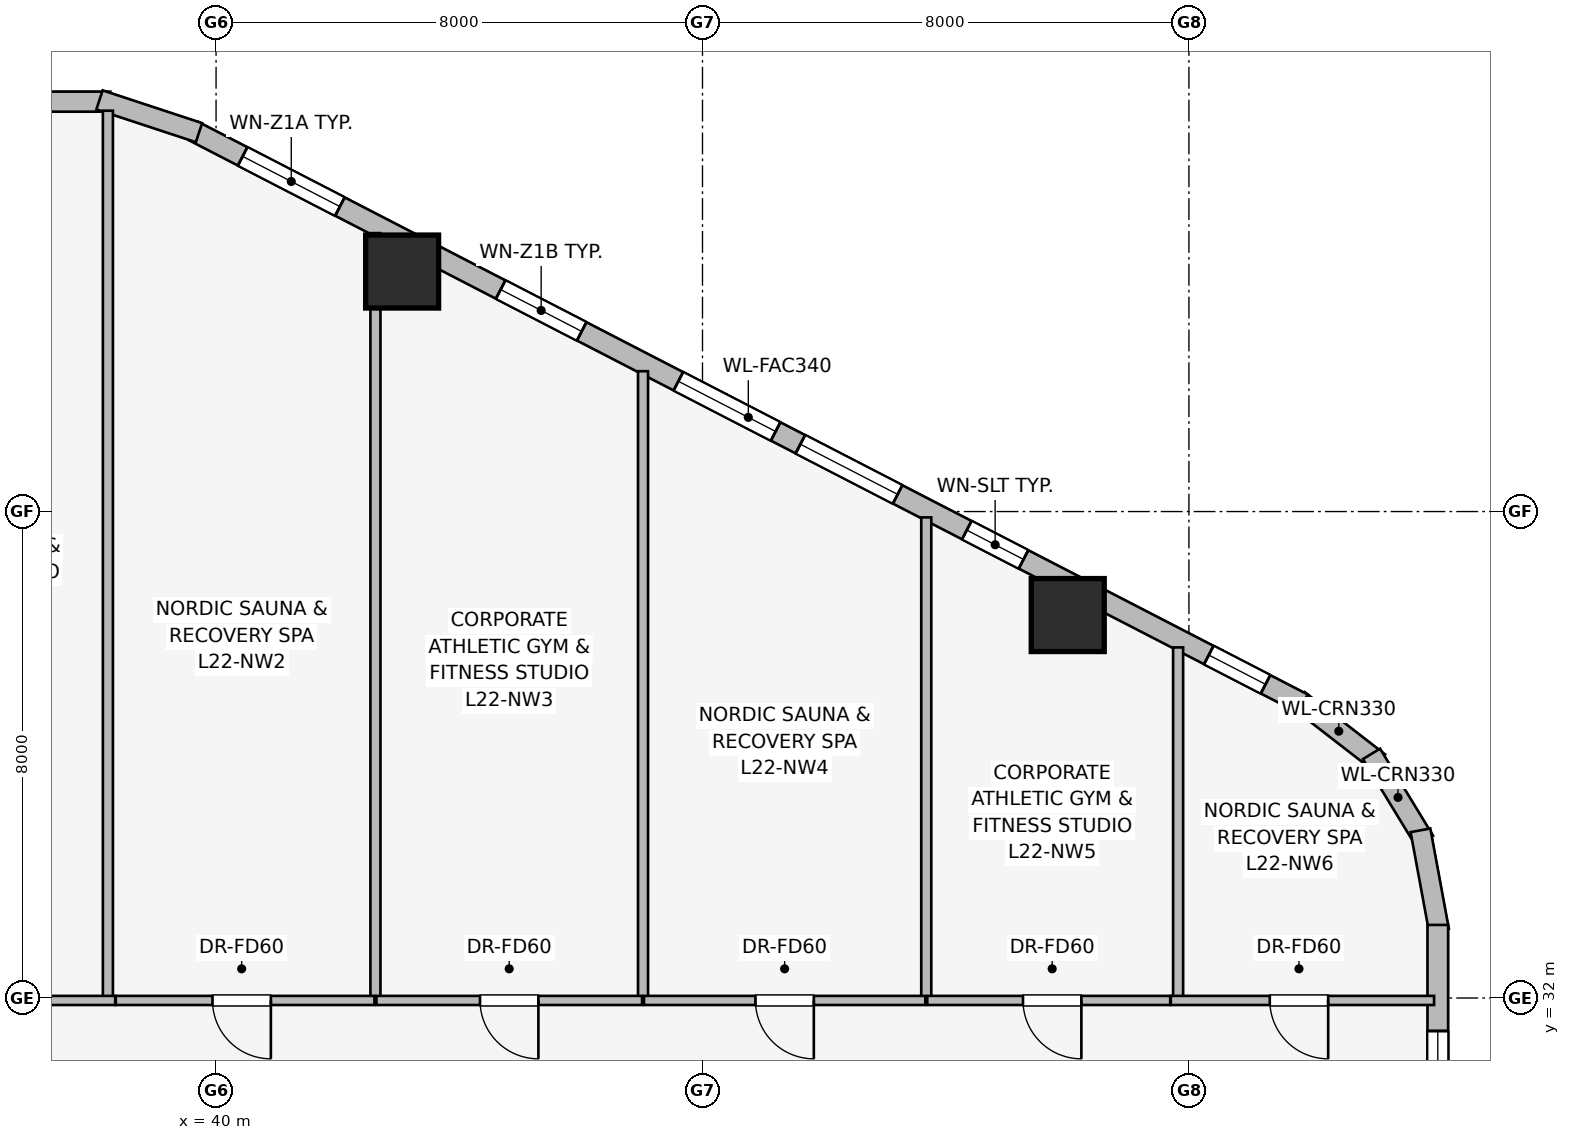
"""IFC4 building model, lengths in metres.
Left out: names, types, materials, properties, quantities, classifications, styles, units other than length and angle.
Written with IfcOpenShell. Run it as: python <this file> out.ifc"""

import sys

from ifc_helpers import new_model, si_unit, direction, frame, frame_2d, origin, origin_2d, place, context, subcontext, project, spatial, rectangle, extrude, element, fill, save


model = new_model("IFC4")
c1 = context("Model", 3, precision=1e-05, world=origin(), true_north=direction((0.0, 1.0)))
c2 = subcontext(c1, "Body", "Model", "MODEL_VIEW")
j1 = project(units=[si_unit("LENGTHUNIT", "METRE"), si_unit("PLANEANGLEUNIT", "RADIAN")], contexts=[c1])
p1 = place(None, origin())
s1 = spatial("IfcSite", under=j1, at=p1, CompositionType="ELEMENT")
p2 = place(p1, origin())
s2 = spatial("IfcBuilding", under=s1, at=p2, CompositionType="ELEMENT")
p3 = place(p2, frame((0.0, 0.0, 85.4)))
s3 = spatial("IfcBuildingStorey", under=s2, at=p3, CompositionType="ELEMENT", Elevation=85.4)
for number, where, z_axis, x_axis in (
    (1, (54.007, 38.298, 0.0), (0.0, 0.0, 1.0), (1.0, 0.0, 0.0)),
    (2, (43.06, 43.947, 0.0), (0.0, 0.0, 1.0), (1.0, 0.0, 0.0)),
):
    element("IfcColumn", number, at=place(p3, frame(where, z_axis=z_axis, x_axis=x_axis)), inside=s3, PredefinedType="COLUMN", context=c2, shape_type="SweptSolid", body=[
        extrude(rectangle(XDim=1.2, YDim=1.2, at=origin_2d()), origin(), (0.0, 0.0, 1.0), 3.65),
    ])
p4 = place(p3, frame((57.802, 36.901, 0.0), z_axis=(0.0, 0.0, 1.0), x_axis=(0.790691856293, -0.61221433207, 0.0)))
e3 = element("IfcWall", 3, at=p4, inside=s3, PredefinedType="STANDARD", context=c2, shape_type="SweptSolid", body=[
    extrude(rectangle(XDim=1.676, YDim=0.33, at=frame_2d((0.838, 0.0))), origin(), (0.0, 0.0, 1.0), 3.39),
])
p5 = place(p3, frame((59.002, 36.015, 0.0), z_axis=(0.0, 0.0, 1.0), x_axis=(0.520584129191, -0.853810379671, 0.0)))
e4 = element("IfcWall", 4, at=p5, inside=s3, PredefinedType="STANDARD", context=c2, shape_type="SweptSolid", body=[
    extrude(rectangle(XDim=1.677, YDim=0.33, at=frame_2d((0.838, 0.0))), origin(), (0.0, 0.0, 1.0), 3.39),
])
p6 = place(p3, frame((59.808, 34.758, 0.0), z_axis=(0.0, 0.0, 1.0), x_axis=(0.181714143354, -0.983351397063, 0.0)))
e5 = element("IfcWall", 5, at=p6, inside=s3, PredefinedType="STANDARD", context=c2, shape_type="SweptSolid", body=[
    extrude(rectangle(XDim=1.678, YDim=0.33, at=frame_2d((0.839, 0.0))), origin(), (0.0, 0.0, 1.0), 3.39),
])
p7 = place(p3, frame((39.631, 46.257, 0.0), z_axis=(0.0, 0.0, 1.0), x_axis=(0.888634413993, -0.458616264721, 0.0)))
e6 = element("IfcWall", 6, at=p7, inside=s3, PredefinedType="STANDARD", context=c2, shape_type="SweptSolid", body=[
    extrude(rectangle(XDim=20.531, YDim=0.34, at=frame_2d((10.266, 0.0))), origin(), (0.0, 0.0, 1.0), 2.684),
])
p8 = place(p7, frame((0.907, 0.0, 0.75)))
e7 = element("IfcOpeningElement", 7, at=p8, cuts=e6, PredefinedType="OPENING", context=c2, shape_type="SweptSolid", body=[
    extrude(rectangle(XDim=1.8, YDim=1.5, at=frame_2d((0.9, 0.75))), frame((0.0, 0.18, 0.0), z_axis=(0.0, -1.0, 0.0), x_axis=(1.0, 0.0, 0.0)), (0.0, 0.0, 1.0), 0.36),
])
p9 = place(p7, frame((5.682, 0.0, 0.75)))
e8 = element("IfcOpeningElement", 8, at=p9, cuts=e6, PredefinedType="OPENING", context=c2, shape_type="SweptSolid", body=[
    extrude(rectangle(XDim=1.5, YDim=1.5, at=frame_2d((0.75, 0.75))), frame((0.0, 0.18, 0.0), z_axis=(0.0, -1.0, 0.0), x_axis=(1.0, 0.0, 0.0)), (0.0, 0.0, 1.0), 0.36),
])
p10 = place(p7, frame((8.971, 0.0, 0.75)))
e9 = element("IfcOpeningElement", 9, at=p10, cuts=e6, PredefinedType="OPENING", context=c2, shape_type="SweptSolid", body=[
    extrude(rectangle(XDim=1.8, YDim=1.5, at=frame_2d((0.9, 0.75))), frame((0.0, 0.18, 0.0), z_axis=(0.0, -1.0, 0.0), x_axis=(1.0, 0.0, 0.0)), (0.0, 0.0, 1.0), 0.36),
])
p11 = place(p7, frame((11.229, 0.0, 0.75)))
e10 = element("IfcOpeningElement", 10, at=p11, cuts=e6, PredefinedType="OPENING", context=c2, shape_type="SweptSolid", body=[
    extrude(rectangle(XDim=1.8, YDim=1.5, at=frame_2d((0.9, 0.75))), frame((0.0, 0.18, 0.0), z_axis=(0.0, -1.0, 0.0), x_axis=(1.0, 0.0, 0.0)), (0.0, 0.0, 1.0), 0.36),
])
p12 = place(p7, frame((14.309, 0.0, 0.75)))
e11 = element("IfcOpeningElement", 11, at=p12, cuts=e6, PredefinedType="OPENING", context=c2, shape_type="SweptSolid", body=[
    extrude(rectangle(XDim=1.05, YDim=1.4, at=frame_2d((0.525, 0.7))), frame((0.0, 0.18, 0.0), z_axis=(0.0, -1.0, 0.0), x_axis=(1.0, 0.0, 0.0)), (0.0, 0.0, 1.0), 0.36),
])
p13 = place(p7, frame((18.788, 0.0, 0.75)))
e12 = element("IfcOpeningElement", 12, at=p13, cuts=e6, PredefinedType="OPENING", context=c2, shape_type="SweptSolid", body=[
    extrude(rectangle(XDim=1.05, YDim=1.4, at=frame_2d((0.525, 0.7))), frame((0.0, 0.18, 0.0), z_axis=(0.0, -1.0, 0.0), x_axis=(1.0, 0.0, 0.0)), (0.0, 0.0, 1.0), 0.36),
])
p14 = place(p3, frame((36.539, 46.741, 0.0), z_axis=(0.0, 0.0, 1.0), x_axis=(1.0, 0.0, 0.0)))
e13 = element("IfcWall", 13, at=p14, inside=s3, PredefinedType="STANDARD", context=c2, shape_type="SweptSolid", body=[
    extrude(rectangle(XDim=1.722, YDim=0.33, at=frame_2d((0.861, 0.0))), origin(), (0.0, 0.0, 1.0), 3.39),
])
p15 = place(p3, frame((38.083, 46.77, 0.0), z_axis=(0.0, 0.0, 1.0), x_axis=(0.94976901097, -0.312951794691, 0.0)))
e14 = element("IfcWall", 14, at=p15, inside=s3, PredefinedType="STANDARD", context=c2, shape_type="SweptSolid", body=[
    extrude(rectangle(XDim=1.722, YDim=0.33, at=frame_2d((0.861, 0.0))), origin(), (0.0, 0.0, 1.0), 3.39),
])
p16 = place(p3, frame((60.093, 33.202, 0.0), z_axis=(0.0, 0.0, 1.0), x_axis=(0.0, -1.0, 0.0)))
e15 = element("IfcWall", 15, at=p16, inside=s3, PredefinedType="STANDARD", context=c2, shape_type="SweptSolid", body=[
    extrude(rectangle(XDim=18.404, YDim=0.34, at=frame_2d((9.202, 0.0))), origin(), (0.0, 0.0, 1.0), 2.684),
])
p17 = place(p16, frame((1.744, 0.0, 0.75)))
e16 = element("IfcOpeningElement", 16, at=p17, cuts=e15, PredefinedType="OPENING", context=c2, shape_type="SweptSolid", body=[
    extrude(rectangle(XDim=1.05, YDim=1.4, at=frame_2d((0.525, 0.7))), frame((0.0, 0.18, 0.0), z_axis=(0.0, -1.0, 0.0), x_axis=(1.0, 0.0, 0.0)), (0.0, 0.0, 1.0), 0.36),
])
p18 = place(p16, frame((5.265, 0.0, 0.75)))
e17 = element("IfcOpeningElement", 17, at=p18, cuts=e15, PredefinedType="OPENING", context=c2, shape_type="SweptSolid", body=[
    extrude(rectangle(XDim=1.5, YDim=1.5, at=frame_2d((0.75, 0.75))), frame((0.0, 0.18, 0.0), z_axis=(0.0, -1.0, 0.0), x_axis=(1.0, 0.0, 0.0)), (0.0, 0.0, 1.0), 0.36),
])
p19 = place(p16, frame((8.452, 0.0, 0.75)))
e18 = element("IfcOpeningElement", 18, at=p19, cuts=e15, PredefinedType="OPENING", context=c2, shape_type="SweptSolid", body=[
    extrude(rectangle(XDim=1.5, YDim=1.5, at=frame_2d((0.75, 0.75))), frame((0.0, 0.18, 0.0), z_axis=(0.0, -1.0, 0.0), x_axis=(1.0, 0.0, 0.0)), (0.0, 0.0, 1.0), 0.36),
])
p20 = place(p16, frame((11.639, 0.0, 0.75)))
e19 = element("IfcOpeningElement", 19, at=p20, cuts=e15, PredefinedType="OPENING", context=c2, shape_type="SweptSolid", body=[
    extrude(rectangle(XDim=1.5, YDim=1.5, at=frame_2d((0.75, 0.75))), frame((0.0, 0.18, 0.0), z_axis=(0.0, -1.0, 0.0), x_axis=(1.0, 0.0, 0.0)), (0.0, 0.0, 1.0), 0.36),
])
p21 = place(p16, frame((15.65, 0.0, 0.75)))
e20 = element("IfcOpeningElement", 20, at=p21, cuts=e15, PredefinedType="OPENING", context=c2, shape_type="SweptSolid", body=[
    extrude(rectangle(XDim=1.05, YDim=1.4, at=frame_2d((0.525, 0.7))), frame((0.0, 0.18, 0.0), z_axis=(0.0, -1.0, 0.0), x_axis=(1.0, 0.0, 0.0)), (0.0, 0.0, 1.0), 0.36),
])
p22 = place(p3, frame((38.221, 31.97, 0.0), z_axis=(0.0, 0.0, 1.0), x_axis=(0.0, 1.0, 0.0)))
e21 = element("IfcWall", 21, at=p22, inside=s3, PredefinedType="PARTITIONING", context=c2, shape_type="SweptSolid", body=[
    extrude(rectangle(XDim=14.622, YDim=0.165, at=frame_2d((7.311, 0.0))), origin(), (0.0, 0.0, 1.0), 3.39),
])
p23 = place(p3, frame((42.621, 31.97, 0.0), z_axis=(0.0, 0.0, 1.0), x_axis=(0.0, 1.0, 0.0)))
e22 = element("IfcWall", 22, at=p23, inside=s3, PredefinedType="PARTITIONING", context=c2, shape_type="SweptSolid", body=[
    extrude(rectangle(XDim=12.609, YDim=0.165, at=frame_2d((6.305, 0.0))), origin(), (0.0, 0.0, 1.0), 2.513),
])
p24 = place(p3, frame((47.022, 31.97, 0.0), z_axis=(0.0, 0.0, 1.0), x_axis=(0.0, 1.0, 0.0)))
e23 = element("IfcWall", 23, at=p24, inside=s3, PredefinedType="PARTITIONING", context=c2, shape_type="SweptSolid", body=[
    extrude(rectangle(XDim=10.338, YDim=0.165, at=frame_2d((5.169, 0.0))), origin(), (0.0, 0.0, 1.0), 3.39),
])
p25 = place(p3, frame((51.68, 31.97, 0.0), z_axis=(0.0, 0.0, 1.0), x_axis=(0.0, 1.0, 0.0)))
e24 = element("IfcWall", 24, at=p25, inside=s3, PredefinedType="PARTITIONING", context=c2, shape_type="SweptSolid", body=[
    extrude(rectangle(XDim=7.934, YDim=0.165, at=frame_2d((3.967, 0.0))), origin(), (0.0, 0.0, 1.0), 3.39),
])
p26 = place(p3, frame((55.822, 31.97, 0.0), z_axis=(0.0, 0.0, 1.0), x_axis=(0.0, 1.0, 0.0)))
e25 = element("IfcWall", 25, at=p26, inside=s3, PredefinedType="PARTITIONING", context=c2, shape_type="SweptSolid", body=[
    extrude(rectangle(XDim=5.796, YDim=0.165, at=frame_2d((2.898, 0.0))), origin(), (0.0, 0.0, 1.0), 3.39),
])
p27 = place(p3, frame((38.341, 31.96, 0.0), z_axis=(0.0, 0.0, 1.0), x_axis=(-1.0, 0.0, 0.0)))
e26 = element("IfcWall", 26, at=p27, inside=s3, PredefinedType="PARTITIONING", context=c2, shape_type="SweptSolid", body=[
    extrude(rectangle(XDim=4.051, YDim=0.15, at=frame_2d((2.025, 0.0))), origin(), (0.0, 0.0, 1.0), 3.39),
])
p28 = place(p27, frame((1.489, 0.0, 0.0)))
e27 = element("IfcOpeningElement", 27, at=p28, cuts=e26, PredefinedType="OPENING", context=c2, shape_type="SweptSolid", body=[
    extrude(rectangle(XDim=0.96, YDim=2.0, at=frame_2d((0.48, 1.0))), frame((0.0, 0.085, 0.0), z_axis=(0.0, -1.0, 0.0), x_axis=(1.0, 0.0, 0.0)), (0.0, 0.0, 1.0), 0.17),
])
p29 = place(p3, frame((42.605, 31.96, 0.0), z_axis=(0.0, 0.0, 1.0), x_axis=(-1.0, 0.0, 0.0)))
e28 = element("IfcWall", 28, at=p29, inside=s3, PredefinedType="PARTITIONING", context=c2, shape_type="SweptSolid", body=[
    extrude(rectangle(XDim=4.254, YDim=0.15, at=frame_2d((2.127, 0.0))), origin(), (0.0, 0.0, 1.0), 3.39),
])
p30 = place(p29, frame((1.704, 0.0, 0.0)))
e29 = element("IfcOpeningElement", 29, at=p30, cuts=e28, PredefinedType="OPENING", context=c2, shape_type="SweptSolid", body=[
    extrude(rectangle(XDim=0.96, YDim=2.0, at=frame_2d((0.48, 1.0))), frame((0.0, 0.085, 0.0), z_axis=(0.0, -1.0, 0.0), x_axis=(1.0, 0.0, 0.0)), (0.0, 0.0, 1.0), 0.17),
])
p31 = place(p3, frame((47.006, 31.96, 0.0), z_axis=(0.0, 0.0, 1.0), x_axis=(-1.0, 0.0, 0.0)))
e30 = element("IfcWall", 30, at=p31, inside=s3, PredefinedType="PARTITIONING", context=c2, shape_type="SweptSolid", body=[
    extrude(rectangle(XDim=4.369, YDim=0.15, at=frame_2d((2.185, 0.0))), origin(), (0.0, 0.0, 1.0), 3.39),
])
p32 = place(p31, frame((1.705, 0.0, 0.0)))
e31 = element("IfcOpeningElement", 31, at=p32, cuts=e30, PredefinedType="OPENING", context=c2, shape_type="SweptSolid", body=[
    extrude(rectangle(XDim=0.96, YDim=2.0, at=frame_2d((0.48, 1.0))), frame((0.0, 0.085, 0.0), z_axis=(0.0, -1.0, 0.0), x_axis=(1.0, 0.0, 0.0)), (0.0, 0.0, 1.0), 0.17),
])
p33 = place(p3, frame((51.664, 31.96, 0.0), z_axis=(0.0, 0.0, 1.0), x_axis=(-1.0, 0.0, 0.0)))
e32 = element("IfcWall", 32, at=p33, inside=s3, PredefinedType="PARTITIONING", context=c2, shape_type="SweptSolid", body=[
    extrude(rectangle(XDim=4.626, YDim=0.15, at=frame_2d((2.313, 0.0))), origin(), (0.0, 0.0, 1.0), 3.39),
])
p34 = place(p33, frame((1.833, 0.0, 0.0)))
e33 = element("IfcOpeningElement", 33, at=p34, cuts=e32, PredefinedType="OPENING", context=c2, shape_type="SweptSolid", body=[
    extrude(rectangle(XDim=0.96, YDim=2.0, at=frame_2d((0.48, 1.0))), frame((0.0, 0.085, 0.0), z_axis=(0.0, -1.0, 0.0), x_axis=(1.0, 0.0, 0.0)), (0.0, 0.0, 1.0), 0.17),
])
p35 = place(p3, frame((55.692, 31.96, 0.0), z_axis=(0.0, 0.0, 1.0), x_axis=(-1.0, 0.0, 0.0)))
e34 = element("IfcWall", 34, at=p35, inside=s3, PredefinedType="PARTITIONING", context=c2, shape_type="SweptSolid", body=[
    extrude(rectangle(XDim=3.996, YDim=0.15, at=frame_2d((1.998, 0.0))), origin(), (0.0, 0.0, 1.0), 3.39),
])
p36 = place(p35, frame((1.461, 0.0, 0.0)))
e35 = element("IfcOpeningElement", 35, at=p36, cuts=e34, PredefinedType="OPENING", context=c2, shape_type="SweptSolid", body=[
    extrude(rectangle(XDim=0.96, YDim=2.0, at=frame_2d((0.48, 1.0))), frame((0.0, 0.085, 0.0), z_axis=(0.0, -1.0, 0.0), x_axis=(1.0, 0.0, 0.0)), (0.0, 0.0, 1.0), 0.17),
])
p37 = place(p3, frame((60.032, 31.96, 0.0), z_axis=(0.0, 0.0, 1.0), x_axis=(-1.0, 0.0, 0.0)))
e36 = element("IfcWall", 36, at=p37, inside=s3, PredefinedType="PARTITIONING", context=c2, shape_type="SweptSolid", body=[
    extrude(rectangle(XDim=4.33, YDim=0.15, at=frame_2d((2.165, 0.0))), origin(), (0.0, 0.0, 1.0), 3.39),
])
p38 = place(p37, frame((1.742, 0.0, 0.0)))
e37 = element("IfcOpeningElement", 37, at=p38, cuts=e36, PredefinedType="OPENING", context=c2, shape_type="SweptSolid", body=[
    extrude(rectangle(XDim=0.96, YDim=2.0, at=frame_2d((0.48, 1.0))), frame((0.0, 0.085, 0.0), z_axis=(0.0, -1.0, 0.0), x_axis=(1.0, 0.0, 0.0)), (0.0, 0.0, 1.0), 0.17),
])
p39 = place(p8, origin())
e38 = element("IfcWindow", 38, at=p39, inside=s3, PartitioningType="SINGLE_PANEL", PredefinedType="WINDOW", context=c2, shape_type="SweptSolid", body=[
    extrude(rectangle(XDim=1.8, YDim=1.5, at=frame_2d((0.9, 0.75))), frame((0.0, 0.03, 0.0), z_axis=(0.0, -1.0, 0.0), x_axis=(1.0, 0.0, 0.0)), (0.0, 0.0, 1.0), 0.06),
])
fill(e7, e38)
p40 = place(p9, origin())
e39 = element("IfcWindow", 39, at=p40, inside=s3, PartitioningType="SINGLE_PANEL", PredefinedType="WINDOW", context=c2, shape_type="SweptSolid", body=[
    extrude(rectangle(XDim=1.5, YDim=1.5, at=frame_2d((0.75, 0.75))), frame((0.0, 0.03, 0.0), z_axis=(0.0, -1.0, 0.0), x_axis=(1.0, 0.0, 0.0)), (0.0, 0.0, 1.0), 0.06),
])
fill(e8, e39)
p41 = place(p10, origin())
e40 = element("IfcWindow", 40, at=p41, inside=s3, PartitioningType="SINGLE_PANEL", PredefinedType="WINDOW", context=c2, shape_type="SweptSolid", body=[
    extrude(rectangle(XDim=1.8, YDim=1.5, at=frame_2d((0.9, 0.75))), frame((0.0, 0.03, 0.0), z_axis=(0.0, -1.0, 0.0), x_axis=(1.0, 0.0, 0.0)), (0.0, 0.0, 1.0), 0.06),
])
fill(e9, e40)
p42 = place(p11, origin())
e41 = element("IfcWindow", 41, at=p42, inside=s3, PartitioningType="SINGLE_PANEL", PredefinedType="WINDOW", context=c2, shape_type="SweptSolid", body=[
    extrude(rectangle(XDim=1.8, YDim=1.5, at=frame_2d((0.9, 0.75))), frame((0.0, 0.03, 0.0), z_axis=(0.0, -1.0, 0.0), x_axis=(1.0, 0.0, 0.0)), (0.0, 0.0, 1.0), 0.06),
])
fill(e10, e41)
p43 = place(p12, origin())
e42 = element("IfcWindow", 42, at=p43, inside=s3, PartitioningType="SINGLE_PANEL", PredefinedType="WINDOW", context=c2, shape_type="SweptSolid", body=[
    extrude(rectangle(XDim=1.05, YDim=1.4, at=frame_2d((0.525, 0.7))), frame((0.0, 0.03, 0.0), z_axis=(0.0, -1.0, 0.0), x_axis=(1.0, 0.0, 0.0)), (0.0, 0.0, 1.0), 0.06),
])
fill(e11, e42)
p44 = place(p13, origin())
e43 = element("IfcWindow", 43, at=p44, inside=s3, PartitioningType="SINGLE_PANEL", PredefinedType="WINDOW", context=c2, shape_type="SweptSolid", body=[
    extrude(rectangle(XDim=1.05, YDim=1.4, at=frame_2d((0.525, 0.7))), frame((0.0, 0.03, 0.0), z_axis=(0.0, -1.0, 0.0), x_axis=(1.0, 0.0, 0.0)), (0.0, 0.0, 1.0), 0.06),
])
fill(e12, e43)
p45 = place(p17, origin())
e44 = element("IfcWindow", 44, at=p45, inside=s3, PartitioningType="SINGLE_PANEL", PredefinedType="WINDOW", context=c2, shape_type="SweptSolid", body=[
    extrude(rectangle(XDim=1.05, YDim=1.4, at=frame_2d((0.525, 0.7))), frame((0.0, 0.03, 0.0), z_axis=(0.0, -1.0, 0.0), x_axis=(1.0, 0.0, 0.0)), (0.0, 0.0, 1.0), 0.06),
])
fill(e16, e44)
p46 = place(p30, origin())
e45 = element("IfcDoor", 45, at=p46, inside=s3, OperationType="SINGLE_SWING_LEFT", PredefinedType="DOOR", context=c2, shape_type="SweptSolid", body=[
    extrude(rectangle(XDim=0.96, YDim=2.0, at=frame_2d((0.48, 1.0))), frame((0.0, 0.025, 0.0), z_axis=(0.0, -1.0, 0.0), x_axis=(1.0, 0.0, 0.0)), (0.0, 0.0, 1.0), 0.05),
])
fill(e29, e45)
p47 = place(p32, origin())
e46 = element("IfcDoor", 46, at=p47, inside=s3, OperationType="SINGLE_SWING_LEFT", PredefinedType="DOOR", context=c2, shape_type="SweptSolid", body=[
    extrude(rectangle(XDim=0.96, YDim=2.0, at=frame_2d((0.48, 1.0))), frame((0.0, 0.025, 0.0), z_axis=(0.0, -1.0, 0.0), x_axis=(1.0, 0.0, 0.0)), (0.0, 0.0, 1.0), 0.05),
])
fill(e31, e46)
p48 = place(p34, origin())
e47 = element("IfcDoor", 47, at=p48, inside=s3, OperationType="SINGLE_SWING_LEFT", PredefinedType="DOOR", context=c2, shape_type="SweptSolid", body=[
    extrude(rectangle(XDim=0.96, YDim=2.0, at=frame_2d((0.48, 1.0))), frame((0.0, 0.025, 0.0), z_axis=(0.0, -1.0, 0.0), x_axis=(1.0, 0.0, 0.0)), (0.0, 0.0, 1.0), 0.05),
])
fill(e33, e47)
p49 = place(p36, origin())
e48 = element("IfcDoor", 48, at=p49, inside=s3, OperationType="SINGLE_SWING_LEFT", PredefinedType="DOOR", context=c2, shape_type="SweptSolid", body=[
    extrude(rectangle(XDim=0.96, YDim=2.0, at=frame_2d((0.48, 1.0))), frame((0.0, 0.025, 0.0), z_axis=(0.0, -1.0, 0.0), x_axis=(1.0, 0.0, 0.0)), (0.0, 0.0, 1.0), 0.05),
])
fill(e35, e48)
p50 = place(p38, origin())
e49 = element("IfcDoor", 49, at=p50, inside=s3, OperationType="SINGLE_SWING_LEFT", PredefinedType="DOOR", context=c2, shape_type="SweptSolid", body=[
    extrude(rectangle(XDim=0.96, YDim=2.0, at=frame_2d((0.48, 1.0))), frame((0.0, 0.025, 0.0), z_axis=(0.0, -1.0, 0.0), x_axis=(1.0, 0.0, 0.0)), (0.0, 0.0, 1.0), 0.05),
])
fill(e37, e49)
save(model, sys.argv[1])
